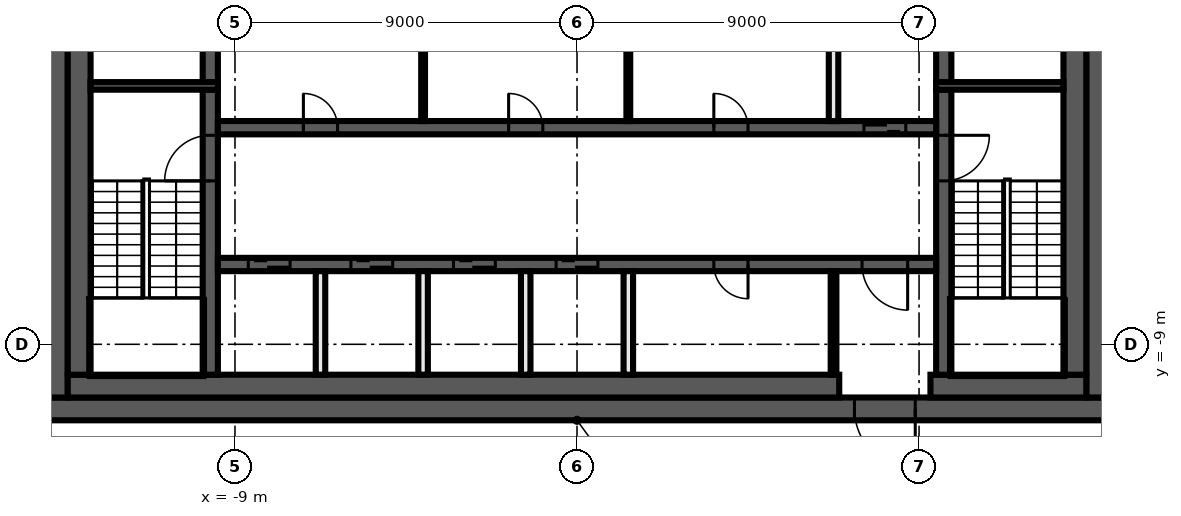
"""IFC4 building model, lengths in metres.
Left out: names, types, materials, properties, quantities, classifications, styles, units other than length and angle.
Written with IfcOpenShell. Run it as: python <this file> out.ifc"""

import sys

from ifc_helpers import new_model, si_unit, direction, frame, frame_2d, origin, place, context, subcontext, project, spatial, rectangle, extrude, element, fill, save


model = new_model("IFC4")
c1 = context("Model", 3, precision=1e-05, world=origin(), true_north=direction((0.0, 1.0)))
c2 = subcontext(c1, "Body", "Model", "MODEL_VIEW")
j1 = project(units=[si_unit("LENGTHUNIT", "METRE"), si_unit("PLANEANGLEUNIT", "RADIAN")], contexts=[c1])
p1 = place(None, origin())
s1 = spatial("IfcSite", under=j1, at=p1, CompositionType="ELEMENT")
p2 = place(p1, origin())
s2 = spatial("IfcBuilding", under=s1, at=p2, CompositionType="ELEMENT")
p3 = place(p2, frame((0.0, 0.0, 319.4)))
s3 = spatial("IfcBuildingStorey", under=s2, at=p3, CompositionType="ELEMENT", Elevation=319.4)
p4 = place(p3, frame((14.0, -10.7, 0.0), z_axis=(0.0, 0.0, 1.0), x_axis=(-1.0, 0.0, 0.0)))
e1 = element("IfcWall", 1, at=p4, inside=s3, PredefinedType="SHEAR", context=c2, shape_type="SweptSolid", body=[
    extrude(rectangle(XDim=28.0, YDim=0.6, at=frame_2d((14.0, 0.0))), origin(), (0.0, 0.0, 1.0), 3.82),
])
p5 = place(p4, frame((5.1, 0.0, 0.0)))
e2 = element("IfcOpeningElement", 2, at=p5, cuts=e1, PredefinedType="OPENING", context=c2, shape_type="SweptSolid", body=[
    extrude(rectangle(XDim=1.6, YDim=2.1, at=frame_2d((0.8, 1.05))), frame((0.0, 0.31, 0.0), z_axis=(0.0, -1.0, 0.0), x_axis=(1.0, 0.0, 0.0)), (0.0, 0.0, 1.0), 0.62),
])
for number, where, z_axis, x_axis in (
    (3, (13.7, 10.4, 0.0), (0.0, 0.0, 1.0), (0.0, -1.0, 0.0)),
    (4, (-13.7, -10.4, 0.0), (0.0, 0.0, 1.0), (0.0, 1.0, 0.0)),
):
    element("IfcWall", number, at=place(p3, frame(where, z_axis=z_axis, x_axis=x_axis)), inside=s3, PredefinedType="SHEAR", context=c2, shape_type="SweptSolid", body=[
        extrude(rectangle(XDim=20.8, YDim=0.6, at=frame_2d((10.4, 0.0))), origin(), (0.0, 0.0, 1.0), 3.82),
    ])
p6 = place(p3, frame((13.4, -10.1, 0.0), z_axis=(0.0, 0.0, 1.0), x_axis=(-1.0, 0.0, 0.0)))
e5 = element("IfcWall", 5, at=p6, inside=s3, PredefinedType="SHEAR", context=c2, shape_type="SweptSolid", body=[
    extrude(rectangle(XDim=4.1, YDim=0.6, at=frame_2d((2.05, 0.0))), origin(), (0.0, 0.0, 1.0), 3.82),
])
p7 = place(p3, frame((6.9, -10.1, 0.0), z_axis=(0.0, 0.0, 1.0), x_axis=(-1.0, 0.0, 0.0)))
e6 = element("IfcWall", 6, at=p7, inside=s3, PredefinedType="SHEAR", context=c2, shape_type="SweptSolid", body=[
    extrude(rectangle(XDim=20.3, YDim=0.6, at=frame_2d((10.15, 0.0))), origin(), (0.0, 0.0, 1.0), 3.82),
])
for number, where, z_axis, x_axis in (
    (7, (13.1, 9.8, 0.0), (0.0, 0.0, 1.0), (0.0, -1.0, 0.0)),
    (8, (-13.1, -9.8, 0.0), (0.0, 0.0, 1.0), (0.0, 1.0, 0.0)),
):
    element("IfcWall", number, at=place(p3, frame(where, z_axis=z_axis, x_axis=x_axis)), inside=s3, PredefinedType="SHEAR", context=c2, shape_type="SweptSolid", body=[
        extrude(rectangle(XDim=19.6, YDim=0.6, at=frame_2d((9.8, 0.0))), origin(), (0.0, 0.0, 1.0), 3.82),
    ])
p8 = place(p3, frame((9.65, -2.3, 0.0), z_axis=(0.0, 0.0, 1.0), x_axis=(0.0, -1.0, 0.0)))
e9 = element("IfcWall", 9, at=p8, inside=s3, PredefinedType="SHEAR", context=c2, shape_type="SweptSolid", body=[
    extrude(rectangle(XDim=7.5, YDim=0.4, at=frame_2d((3.75, 0.0))), origin(), (0.0, 0.0, 1.0), 3.82),
])
p9 = place(p8, frame((1.2, 0.0, 0.0)))
e10 = element("IfcOpeningElement", 10, at=p9, cuts=e9, PredefinedType="OPENING", context=c2, shape_type="SweptSolid", body=[
    extrude(rectangle(XDim=1.2, YDim=2.1, at=frame_2d((0.6, 1.05))), frame((0.0, 0.21, 0.0), z_axis=(0.0, -1.0, 0.0), x_axis=(1.0, 0.0, 0.0)), (0.0, 0.0, 1.0), 0.42),
])
p10 = place(p3, frame((9.65, 2.1, 0.0), z_axis=(0.0, 0.0, 1.0), x_axis=(0.0, -1.0, 0.0)))
e11 = element("IfcWall", 11, at=p10, inside=s3, PredefinedType="SHEAR", context=c2, shape_type="SweptSolid", body=[
    extrude(rectangle(XDim=4.2, YDim=0.4, at=frame_2d((2.1, 0.0))), origin(), (0.0, 0.0, 1.0), 3.82),
])
p11 = place(p10, frame((0.15, 0.0, 0.0)))
e12 = element("IfcOpeningElement", 12, at=p11, cuts=e11, PredefinedType="OPENING", context=c2, shape_type="SweptSolid", body=[
    extrude(rectangle(XDim=0.9, YDim=2.1, at=frame_2d((0.45, 1.05))), frame((0.0, 0.21, 0.0), z_axis=(0.0, -1.0, 0.0), x_axis=(1.0, 0.0, 0.0)), (0.0, 0.0, 1.0), 0.42),
])
p12 = place(p3, frame((-9.65, -9.8, 0.0), z_axis=(0.0, 0.0, 1.0), x_axis=(0.0, 1.0, 0.0)))
e13 = element("IfcWall", 13, at=p12, inside=s3, PredefinedType="SHEAR", context=c2, shape_type="SweptSolid", body=[
    extrude(rectangle(XDim=7.5, YDim=0.4, at=frame_2d((3.75, 0.0))), origin(), (0.0, 0.0, 1.0), 3.82),
])
p13 = place(p12, frame((5.1, 0.0, 0.0)))
e14 = element("IfcOpeningElement", 14, at=p13, cuts=e13, PredefinedType="OPENING", context=c2, shape_type="SweptSolid", body=[
    extrude(rectangle(XDim=1.2, YDim=2.1, at=frame_2d((0.6, 1.05))), frame((0.0, 0.21, 0.0), z_axis=(0.0, -1.0, 0.0), x_axis=(1.0, 0.0, 0.0)), (0.0, 0.0, 1.0), 0.42),
])
p14 = place(p3, frame((-9.65, -2.1, 0.0), z_axis=(0.0, 0.0, 1.0), x_axis=(0.0, 1.0, 0.0)))
e15 = element("IfcWall", 15, at=p14, inside=s3, PredefinedType="SHEAR", context=c2, shape_type="SweptSolid", body=[
    extrude(rectangle(XDim=4.2, YDim=0.4, at=frame_2d((2.1, 0.0))), origin(), (0.0, 0.0, 1.0), 3.82),
])
for number, where, z_axis, x_axis in (
    (16, (9.45, -2.2, 0.0), (0.0, 0.0, 1.0), (1.0, 0.0, 0.0)),
    (17, (-9.45, -2.2, 0.0), (0.0, 0.0, 1.0), (-1.0, 0.0, 0.0)),
):
    element("IfcWall", number, at=place(p3, frame(where, z_axis=z_axis, x_axis=x_axis)), inside=s3, PredefinedType="SHEAR", context=c2, shape_type="SweptSolid", body=[
        extrude(rectangle(XDim=3.35, YDim=0.2, at=frame_2d((1.675, 0.0))), origin(), (0.0, 0.0, 1.0), 3.82),
    ])
p15 = place(p3, frame((-9.45, -3.3, 0.0), z_axis=(0.0, 0.0, 1.0), x_axis=(1.0, 0.0, 0.0)))
e18 = element("IfcWall", 18, at=p15, inside=s3, PredefinedType="SHEAR", context=c2, shape_type="SweptSolid", body=[
    extrude(rectangle(XDim=18.9, YDim=0.35, at=frame_2d((9.45, 0.0))), origin(), (0.0, 0.0, 1.0), 3.82),
])
p16 = place(p15, frame((17.0, 0.0, 0.0)))
e19 = element("IfcOpeningElement", 19, at=p16, cuts=e18, PredefinedType="OPENING", context=c2, shape_type="SweptSolid", body=[
    extrude(rectangle(XDim=1.1, YDim=2.1, at=frame_2d((0.55, 1.05))), frame((0.0, 0.185, 0.0), z_axis=(0.0, -1.0, 0.0), x_axis=(1.0, 0.0, 0.0)), (0.0, 0.0, 1.0), 0.37),
])
p17 = place(p15, frame((2.25, 0.0, 0.0)))
e20 = element("IfcOpeningElement", 20, at=p17, cuts=e18, PredefinedType="OPENING", context=c2, shape_type="SweptSolid", body=[
    extrude(rectangle(XDim=0.9, YDim=2.1, at=frame_2d((0.45, 1.05))), frame((0.0, 0.185, 0.0), z_axis=(0.0, -1.0, 0.0), x_axis=(1.0, 0.0, 0.0)), (0.0, 0.0, 1.0), 0.37),
])
p18 = place(p15, frame((7.65, 0.0, 0.0)))
e21 = element("IfcOpeningElement", 21, at=p18, cuts=e18, PredefinedType="OPENING", context=c2, shape_type="SweptSolid", body=[
    extrude(rectangle(XDim=0.9, YDim=2.1, at=frame_2d((0.45, 1.05))), frame((0.0, 0.185, 0.0), z_axis=(0.0, -1.0, 0.0), x_axis=(1.0, 0.0, 0.0)), (0.0, 0.0, 1.0), 0.37),
])
p19 = place(p15, frame((13.05, 0.0, 0.0)))
e22 = element("IfcOpeningElement", 22, at=p19, cuts=e18, PredefinedType="OPENING", context=c2, shape_type="SweptSolid", body=[
    extrude(rectangle(XDim=0.9, YDim=2.1, at=frame_2d((0.45, 1.05))), frame((0.0, 0.185, 0.0), z_axis=(0.0, -1.0, 0.0), x_axis=(1.0, 0.0, 0.0)), (0.0, 0.0, 1.0), 0.37),
])
p20 = place(p3, frame((9.45, -6.9, 0.0), z_axis=(0.0, 0.0, 1.0), x_axis=(-1.0, 0.0, 0.0)))
e23 = element("IfcWall", 23, at=p20, inside=s3, PredefinedType="SHEAR", context=c2, shape_type="SweptSolid", body=[
    extrude(rectangle(XDim=18.9, YDim=0.35, at=frame_2d((9.45, 0.0))), origin(), (0.0, 0.0, 1.0), 3.82),
])
p21 = place(p20, frame((17.0, 0.0, 0.0)))
e24 = element("IfcOpeningElement", 24, at=p21, cuts=e23, PredefinedType="OPENING", context=c2, shape_type="SweptSolid", body=[
    extrude(rectangle(XDim=1.1, YDim=2.1, at=frame_2d((0.55, 1.05))), frame((0.0, 0.185, 0.0), z_axis=(0.0, -1.0, 0.0), x_axis=(1.0, 0.0, 0.0)), (0.0, 0.0, 1.0), 0.37),
])
p22 = place(p20, frame((14.3, 0.0, 0.0)))
e25 = element("IfcOpeningElement", 25, at=p22, cuts=e23, PredefinedType="OPENING", context=c2, shape_type="SweptSolid", body=[
    extrude(rectangle(XDim=1.1, YDim=2.1, at=frame_2d((0.55, 1.05))), frame((0.0, 0.185, 0.0), z_axis=(0.0, -1.0, 0.0), x_axis=(1.0, 0.0, 0.0)), (0.0, 0.0, 1.0), 0.37),
])
p23 = place(p20, frame((11.6, 0.0, 0.0)))
e26 = element("IfcOpeningElement", 26, at=p23, cuts=e23, PredefinedType="OPENING", context=c2, shape_type="SweptSolid", body=[
    extrude(rectangle(XDim=1.1, YDim=2.1, at=frame_2d((0.55, 1.05))), frame((0.0, 0.185, 0.0), z_axis=(0.0, -1.0, 0.0), x_axis=(1.0, 0.0, 0.0)), (0.0, 0.0, 1.0), 0.37),
])
p24 = place(p20, frame((8.9, 0.0, 0.0)))
e27 = element("IfcOpeningElement", 27, at=p24, cuts=e23, PredefinedType="OPENING", context=c2, shape_type="SweptSolid", body=[
    extrude(rectangle(XDim=1.1, YDim=2.1, at=frame_2d((0.55, 1.05))), frame((0.0, 0.185, 0.0), z_axis=(0.0, -1.0, 0.0), x_axis=(1.0, 0.0, 0.0)), (0.0, 0.0, 1.0), 0.37),
])
p25 = place(p20, frame((0.75, 0.0, 0.0)))
e28 = element("IfcOpeningElement", 28, at=p25, cuts=e23, PredefinedType="OPENING", context=c2, shape_type="SweptSolid", body=[
    extrude(rectangle(XDim=1.2, YDim=2.1, at=frame_2d((0.6, 1.05))), frame((0.0, 0.185, 0.0), z_axis=(0.0, -1.0, 0.0), x_axis=(1.0, 0.0, 0.0)), (0.0, 0.0, 1.0), 0.37),
])
p26 = place(p20, frame((4.95, 0.0, 0.0)))
e29 = element("IfcOpeningElement", 29, at=p26, cuts=e23, PredefinedType="OPENING", context=c2, shape_type="SweptSolid", body=[
    extrude(rectangle(XDim=0.9, YDim=2.1, at=frame_2d((0.45, 1.05))), frame((0.0, 0.185, 0.0), z_axis=(0.0, -1.0, 0.0), x_axis=(1.0, 0.0, 0.0)), (0.0, 0.0, 1.0), 0.37),
])
p27 = place(p3, frame((6.75, -9.8, 0.0), z_axis=(0.0, 0.0, 1.0), x_axis=(0.0, 1.0, 0.0)))
e30 = element("IfcWall", 30, at=p27, inside=s3, PredefinedType="PARTITIONING", context=c2, shape_type="SweptSolid", body=[
    extrude(rectangle(XDim=2.725, YDim=0.15, at=frame_2d((1.363, 0.0))), origin(), (0.0, 0.0, 1.0), 3.82),
])
p28 = place(p3, frame((6.75, -3.125, 0.0), z_axis=(0.0, 0.0, 1.0), x_axis=(0.0, 1.0, 0.0)))
e31 = element("IfcWall", 31, at=p28, inside=s3, PredefinedType="SOLIDWALL", context=c2, shape_type="SweptSolid", body=[
    extrude(rectangle(XDim=2.725, YDim=0.25, at=frame_2d((1.363, 0.0))), origin(), (0.0, 0.0, 1.0), 3.82),
])
p29 = place(p3, frame((1.35, -3.125, 0.0), z_axis=(0.0, 0.0, 1.0), x_axis=(0.0, 1.0, 0.0)))
e32 = element("IfcWall", 32, at=p29, inside=s3, PredefinedType="PARTITIONING", context=c2, shape_type="SweptSolid", body=[
    extrude(rectangle(XDim=2.725, YDim=0.1, at=frame_2d((1.363, 0.0))), origin(), (0.0, 0.0, 1.0), 3.82),
])
for number, where, z_axis, x_axis in (
    (33, (1.35, -9.8, 0.0), (0.0, 0.0, 1.0), (0.0, 1.0, 0.0)),
    (34, (-1.35, -9.8, 0.0), (0.0, 0.0, 1.0), (0.0, 1.0, 0.0)),
):
    element("IfcWall", number, at=place(p3, frame(where, z_axis=z_axis, x_axis=x_axis)), inside=s3, PredefinedType="SOLIDWALL", context=c2, shape_type="SweptSolid", body=[
        extrude(rectangle(XDim=2.725, YDim=0.25, at=frame_2d((1.363, 0.0))), origin(), (0.0, 0.0, 1.0), 3.82),
    ])
p30 = place(p3, frame((-4.05, -3.125, 0.0), z_axis=(0.0, 0.0, 1.0), x_axis=(0.0, 1.0, 0.0)))
e35 = element("IfcWall", 35, at=p30, inside=s3, PredefinedType="PARTITIONING", context=c2, shape_type="SweptSolid", body=[
    extrude(rectangle(XDim=2.725, YDim=0.1, at=frame_2d((1.363, 0.0))), origin(), (0.0, 0.0, 1.0), 3.82),
])
for number, where, z_axis, x_axis in (
    (36, (-4.05, -9.8, 0.0), (0.0, 0.0, 1.0), (0.0, 1.0, 0.0)),
    (37, (-6.75, -9.8, 0.0), (0.0, 0.0, 1.0), (0.0, 1.0, 0.0)),
):
    element("IfcWall", number, at=place(p3, frame(where, z_axis=z_axis, x_axis=x_axis)), inside=s3, PredefinedType="SOLIDWALL", context=c2, shape_type="SweptSolid", body=[
        extrude(rectangle(XDim=2.725, YDim=0.25, at=frame_2d((1.363, 0.0))), origin(), (0.0, 0.0, 1.0), 3.82),
    ])
p31 = place(p16, origin())
e38 = element("IfcDoor", 38, at=p31, inside=s3, OperationType="DOUBLE_DOOR_SLIDING", PredefinedType="DOOR", context=c2, shape_type="SweptSolid", body=[
    extrude(rectangle(XDim=1.1, YDim=2.1, at=frame_2d((0.55, 1.05))), frame((0.0, 0.025, 0.0), z_axis=(0.0, -1.0, 0.0), x_axis=(1.0, 0.0, 0.0)), (0.0, 0.0, 1.0), 0.05),
])
fill(e19, e38)
p32 = place(p21, origin())
e39 = element("IfcDoor", 39, at=p32, inside=s3, OperationType="DOUBLE_DOOR_SLIDING", PredefinedType="DOOR", context=c2, shape_type="SweptSolid", body=[
    extrude(rectangle(XDim=1.1, YDim=2.1, at=frame_2d((0.55, 1.05))), frame((0.0, 0.025, 0.0), z_axis=(0.0, -1.0, 0.0), x_axis=(1.0, 0.0, 0.0)), (0.0, 0.0, 1.0), 0.05),
])
fill(e24, e39)
p33 = place(p22, origin())
e40 = element("IfcDoor", 40, at=p33, inside=s3, OperationType="DOUBLE_DOOR_SLIDING", PredefinedType="DOOR", context=c2, shape_type="SweptSolid", body=[
    extrude(rectangle(XDim=1.1, YDim=2.1, at=frame_2d((0.55, 1.05))), frame((0.0, 0.025, 0.0), z_axis=(0.0, -1.0, 0.0), x_axis=(1.0, 0.0, 0.0)), (0.0, 0.0, 1.0), 0.05),
])
fill(e25, e40)
p34 = place(p23, origin())
e41 = element("IfcDoor", 41, at=p34, inside=s3, OperationType="DOUBLE_DOOR_SLIDING", PredefinedType="DOOR", context=c2, shape_type="SweptSolid", body=[
    extrude(rectangle(XDim=1.1, YDim=2.1, at=frame_2d((0.55, 1.05))), frame((0.0, 0.025, 0.0), z_axis=(0.0, -1.0, 0.0), x_axis=(1.0, 0.0, 0.0)), (0.0, 0.0, 1.0), 0.05),
])
fill(e26, e41)
p35 = place(p24, origin())
e42 = element("IfcDoor", 42, at=p35, inside=s3, OperationType="DOUBLE_DOOR_SLIDING", PredefinedType="DOOR", context=c2, shape_type="SweptSolid", body=[
    extrude(rectangle(XDim=1.1, YDim=2.1, at=frame_2d((0.55, 1.05))), frame((0.0, 0.025, 0.0), z_axis=(0.0, -1.0, 0.0), x_axis=(1.0, 0.0, 0.0)), (0.0, 0.0, 1.0), 0.05),
])
fill(e27, e42)
p36 = place(p5, origin())
e43 = element("IfcDoor", 43, at=p36, inside=s3, OperationType="DOUBLE_DOOR_SINGLE_SWING", PredefinedType="DOOR", context=c2, shape_type="SweptSolid", body=[
    extrude(rectangle(XDim=1.6, YDim=2.1, at=frame_2d((0.8, 1.05))), frame((0.0, 0.025, 0.0), z_axis=(0.0, -1.0, 0.0), x_axis=(1.0, 0.0, 0.0)), (0.0, 0.0, 1.0), 0.05),
])
fill(e2, e43)
p37 = place(p25, origin())
e44 = element("IfcDoor", 44, at=p37, inside=s3, OperationType="SINGLE_SWING_LEFT", PredefinedType="DOOR", context=c2, shape_type="SweptSolid", body=[
    extrude(rectangle(XDim=1.2, YDim=2.1, at=frame_2d((0.6, 1.05))), frame((0.0, 0.025, 0.0), z_axis=(0.0, -1.0, 0.0), x_axis=(1.0, 0.0, 0.0)), (0.0, 0.0, 1.0), 0.05),
])
fill(e28, e44)
p38 = place(p17, origin())
e45 = element("IfcDoor", 45, at=p38, inside=s3, OperationType="SINGLE_SWING_LEFT", PredefinedType="DOOR", context=c2, shape_type="SweptSolid", body=[
    extrude(rectangle(XDim=0.9, YDim=2.1, at=frame_2d((0.45, 1.05))), frame((0.0, 0.025, 0.0), z_axis=(0.0, -1.0, 0.0), x_axis=(1.0, 0.0, 0.0)), (0.0, 0.0, 1.0), 0.05),
])
fill(e20, e45)
p39 = place(p18, origin())
e46 = element("IfcDoor", 46, at=p39, inside=s3, OperationType="SINGLE_SWING_RIGHT", PredefinedType="DOOR", context=c2, shape_type="SweptSolid", body=[
    extrude(rectangle(XDim=0.9, YDim=2.1, at=frame_2d((0.45, 1.05))), frame((0.0, 0.025, 0.0), z_axis=(0.0, -1.0, 0.0), x_axis=(1.0, 0.0, 0.0)), (0.0, 0.0, 1.0), 0.05),
])
fill(e21, e46)
p40 = place(p19, origin())
e47 = element("IfcDoor", 47, at=p40, inside=s3, OperationType="SINGLE_SWING_LEFT", PredefinedType="DOOR", context=c2, shape_type="SweptSolid", body=[
    extrude(rectangle(XDim=0.9, YDim=2.1, at=frame_2d((0.45, 1.05))), frame((0.0, 0.025, 0.0), z_axis=(0.0, -1.0, 0.0), x_axis=(1.0, 0.0, 0.0)), (0.0, 0.0, 1.0), 0.05),
])
fill(e22, e47)
p41 = place(p26, origin())
e48 = element("IfcDoor", 48, at=p41, inside=s3, OperationType="SINGLE_SWING_RIGHT", PredefinedType="DOOR", context=c2, shape_type="SweptSolid", body=[
    extrude(rectangle(XDim=0.9, YDim=2.1, at=frame_2d((0.45, 1.05))), frame((0.0, 0.025, 0.0), z_axis=(0.0, -1.0, 0.0), x_axis=(1.0, 0.0, 0.0)), (0.0, 0.0, 1.0), 0.05),
])
fill(e29, e48)
p42 = place(p9, origin())
e49 = element("IfcDoor", 49, at=p42, inside=s3, OperationType="SINGLE_SWING_RIGHT", PredefinedType="DOOR", context=c2, shape_type="SweptSolid", body=[
    extrude(rectangle(XDim=1.2, YDim=2.1, at=frame_2d((0.6, 1.05))), frame((0.0, 0.025, 0.0), z_axis=(0.0, -1.0, 0.0), x_axis=(1.0, 0.0, 0.0)), (0.0, 0.0, 1.0), 0.05),
])
fill(e10, e49)
p43 = place(p13, origin())
e50 = element("IfcDoor", 50, at=p43, inside=s3, OperationType="SINGLE_SWING_LEFT", PredefinedType="DOOR", context=c2, shape_type="SweptSolid", body=[
    extrude(rectangle(XDim=1.2, YDim=2.1, at=frame_2d((0.6, 1.05))), frame((0.0, 0.025, 0.0), z_axis=(0.0, -1.0, 0.0), x_axis=(1.0, 0.0, 0.0)), (0.0, 0.0, 1.0), 0.05),
])
fill(e14, e50)
save(model, sys.argv[1])
